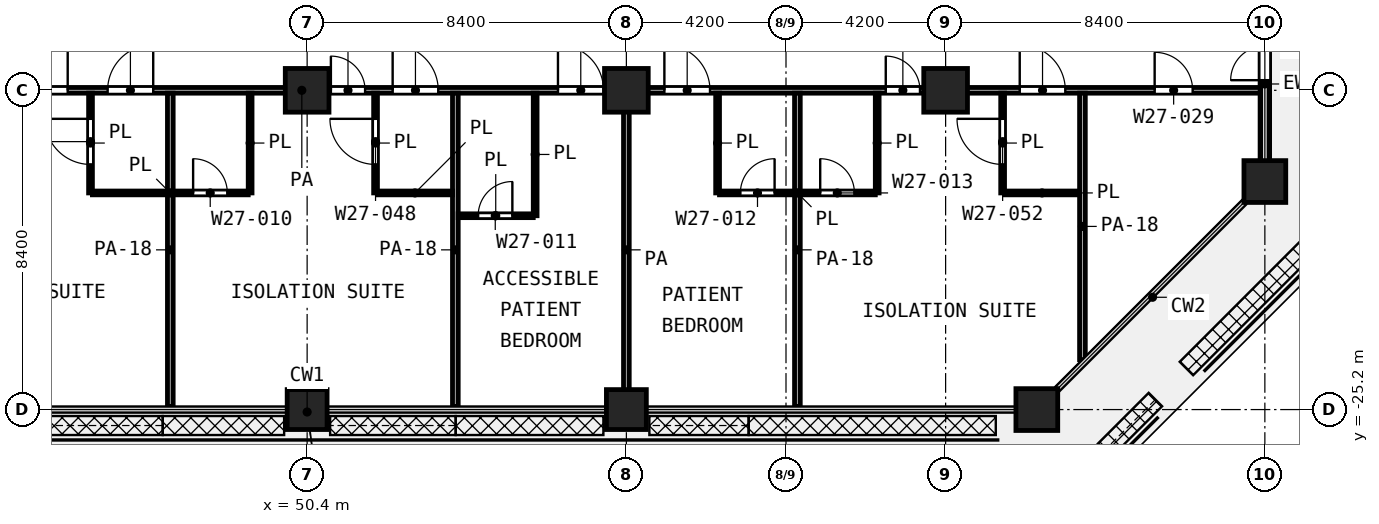
"""IFC4 building model, lengths in metres.
Left out: names, types, materials, properties, quantities, classifications, styles, units other than length and angle.
Written with IfcOpenShell. Run it as: python <this file> out.ifc"""

import sys

from ifc_helpers import new_model, si_unit, direction, frame, frame_2d, origin, origin_2d, place, context, subcontext, project, spatial, rectangle, extrude, element, fill, save


model = new_model("IFC4")
c1 = context("Model", 3, precision=1e-05, world=origin(), true_north=direction((0.0, 1.0)))
c2 = subcontext(c1, "Body", "Model", "MODEL_VIEW")
j1 = project(units=[si_unit("LENGTHUNIT", "METRE"), si_unit("PLANEANGLEUNIT", "RADIAN")], contexts=[c1])
p1 = place(None, origin())
s1 = spatial("IfcSite", under=j1, at=p1, CompositionType="ELEMENT")
p2 = place(p1, origin())
s2 = spatial("IfcBuilding", under=s1, at=p2, CompositionType="ELEMENT")
p3 = place(p2, frame((0.0, 0.0, 119.8)))
s3 = spatial("IfcBuildingStorey", under=s2, at=p3, CompositionType="ELEMENT", Elevation=119.8)
for number, where, z_axis, x_axis in (
    (1, (50.4, -16.8, 0.0), (0.0, 0.0, 1.0), (1.0, 0.0, 0.0)),
    (2, (58.8, -16.8, 0.0), (0.0, 0.0, 1.0), (1.0, 0.0, 0.0)),
    (3, (67.2, -16.8, 0.0), (0.0, 0.0, 1.0), (1.0, 0.0, 0.0)),
):
    element("IfcColumn", number, at=place(p3, frame(where, z_axis=z_axis, x_axis=x_axis)), inside=s3, PredefinedType="COLUMN", context=c2, shape_type="SweptSolid", body=[
        extrude(rectangle(XDim=1.15, YDim=1.15, at=origin_2d()), origin(), (0.0, 0.0, 1.0), 4.2),
    ])
p4 = place(p3, frame((75.6, -19.2, 0.0), z_axis=(0.0, 0.0, 1.0), x_axis=(1.0, 0.0, 0.0)))
e4 = element("IfcColumn", 4, at=p4, inside=s3, PredefinedType="COLUMN", context=c2, shape_type="SweptSolid", body=[
    extrude(rectangle(XDim=1.1, YDim=1.1, at=origin_2d()), origin(), (0.0, 0.0, 1.0), 4.2),
])
for number, where, z_axis, x_axis in (
    (5, (50.4, -25.2, 0.0), (0.0, 0.0, 1.0), (1.0, 0.0, 0.0)),
    (6, (58.8, -25.2, 0.0), (0.0, 0.0, 1.0), (1.0, 0.0, 0.0)),
):
    element("IfcColumn", number, at=place(p3, frame(where, z_axis=z_axis, x_axis=x_axis)), inside=s3, PredefinedType="COLUMN", context=c2, shape_type="SweptSolid", body=[
        extrude(rectangle(XDim=1.05, YDim=1.05, at=origin_2d()), origin(), (0.0, 0.0, 1.0), 4.2),
    ])
p5 = place(p3, frame((69.6, -25.2, 0.0), z_axis=(0.0, 0.0, 1.0), x_axis=(1.0, 0.0, 0.0)))
e7 = element("IfcColumn", 7, at=p5, inside=s3, PredefinedType="COLUMN", context=c2, shape_type="SweptSolid", body=[
    extrude(rectangle(XDim=1.1, YDim=1.1, at=origin_2d()), origin(), (0.0, 0.0, 1.0), 4.2),
])
p6 = place(p3, frame((75.6, -18.65, 0.0), z_axis=(0.0, 0.0, 1.0), x_axis=(0.0, 1.0, 0.0)))
e8 = element("IfcWall", 8, at=p6, inside=s3, PredefinedType="SOLIDWALL", context=c2, shape_type="SweptSolid", body=[
    extrude(rectangle(XDim=4.033, YDim=0.25, at=frame_2d((2.017, 0.0))), origin(), (0.0, 0.0, 1.0), 3.48),
])
p7 = place(p6, frame((2.117, 0.0, 0.0)))
e9 = element("IfcOpeningElement", 9, at=p7, cuts=e8, PredefinedType="OPENING", context=c2, shape_type="SweptSolid", body=[
    extrude(rectangle(XDim=1.8, YDim=2.1, at=frame_2d((0.9, 1.05))), frame((0.0, 0.135, 0.0), z_axis=(0.0, -1.0, 0.0), x_axis=(1.0, 0.0, 0.0)), (0.0, 0.0, 1.0), 0.27),
])
p8 = place(p3, frame((54.375, -20.1, 0.0), z_axis=(0.0, 0.0, 1.0), x_axis=(1.0, 0.0, 0.0)))
e10 = element("IfcWall", 10, at=p8, inside=s3, PredefinedType="PARTITIONING", context=c2, shape_type="SweptSolid", body=[
    extrude(rectangle(XDim=1.975, YDim=0.1, at=frame_2d((0.988, 0.0))), origin(), (0.0, 0.0, 1.0), 3.6),
])
p9 = place(p8, frame((0.525, 0.0, 0.0)))
e11 = element("IfcOpeningElement", 11, at=p9, cuts=e10, PredefinedType="OPENING", context=c2, shape_type="SweptSolid", body=[
    extrude(rectangle(XDim=0.9, YDim=2.1, at=frame_2d((0.45, 1.05))), frame((0.0, 0.06, 0.0), z_axis=(0.0, -1.0, 0.0), x_axis=(1.0, 0.0, 0.0)), (0.0, 0.0, 1.0), 0.12),
])
p10 = place(p3, frame((44.75, -19.5, 0.0), z_axis=(0.0, 0.0, 1.0), x_axis=(1.0, 0.0, 0.0)))
e12 = element("IfcWall", 12, at=p10, inside=s3, PredefinedType="PARTITIONING", context=c2, shape_type="SweptSolid", body=[
    extrude(rectangle(XDim=4.1, YDim=0.1, at=frame_2d((2.05, 0.0))), origin(), (0.0, 0.0, 1.0), 3.6),
])
p11 = place(p10, frame((2.65, 0.0, 0.0)))
e13 = element("IfcOpeningElement", 13, at=p11, cuts=e12, PredefinedType="OPENING", context=c2, shape_type="SweptSolid", body=[
    extrude(rectangle(XDim=0.9, YDim=2.1, at=frame_2d((0.45, 1.05))), frame((0.0, 0.06, 0.0), z_axis=(0.0, -1.0, 0.0), x_axis=(1.0, 0.0, 0.0)), (0.0, 0.0, 1.0), 0.12),
])
p12 = place(p3, frame((52.25, -19.5, 0.0), z_axis=(0.0, 0.0, 1.0), x_axis=(1.0, 0.0, 0.0)))
e14 = element("IfcWall", 14, at=p12, inside=s3, PredefinedType="PARTITIONING", context=c2, shape_type="SweptSolid", body=[
    extrude(rectangle(XDim=1.975, YDim=0.1, at=frame_2d((0.988, 0.0))), origin(), (0.0, 0.0, 1.0), 3.6),
])
p13 = place(p3, frame((61.25, -19.5, 0.0), z_axis=(0.0, 0.0, 1.0), x_axis=(1.0, 0.0, 0.0)))
e15 = element("IfcWall", 15, at=p13, inside=s3, PredefinedType="PARTITIONING", context=c2, shape_type="SweptSolid", body=[
    extrude(rectangle(XDim=4.1, YDim=0.1, at=frame_2d((2.05, 0.0))), origin(), (0.0, 0.0, 1.0), 3.6),
])
p14 = place(p13, frame((0.55, 0.0, 0.0)))
e16 = element("IfcOpeningElement", 16, at=p14, cuts=e15, PredefinedType="OPENING", context=c2, shape_type="SweptSolid", body=[
    extrude(rectangle(XDim=0.9, YDim=2.1, at=frame_2d((0.45, 1.05))), frame((0.0, 0.06, 0.0), z_axis=(0.0, -1.0, 0.0), x_axis=(1.0, 0.0, 0.0)), (0.0, 0.0, 1.0), 0.12),
])
p15 = place(p13, frame((2.65, 0.0, 0.0)))
e17 = element("IfcOpeningElement", 17, at=p15, cuts=e15, PredefinedType="OPENING", context=c2, shape_type="SweptSolid", body=[
    extrude(rectangle(XDim=0.9, YDim=2.1, at=frame_2d((0.45, 1.05))), frame((0.0, 0.06, 0.0), z_axis=(0.0, -1.0, 0.0), x_axis=(1.0, 0.0, 0.0)), (0.0, 0.0, 1.0), 0.12),
])
p16 = place(p3, frame((68.75, -19.5, 0.0), z_axis=(0.0, 0.0, 1.0), x_axis=(1.0, 0.0, 0.0)))
e18 = element("IfcWall", 18, at=p16, inside=s3, PredefinedType="PARTITIONING", context=c2, shape_type="SweptSolid", body=[
    extrude(rectangle(XDim=1.975, YDim=0.1, at=frame_2d((0.988, 0.0))), origin(), (0.0, 0.0, 1.0), 3.6),
])
p17 = place(p3, frame((44.7, -19.5, 0.0), z_axis=(0.0, 0.0, 1.0), x_axis=(0.0, 1.0, 0.0)))
e19 = element("IfcWall", 19, at=p17, inside=s3, PredefinedType="PARTITIONING", context=c2, shape_type="SweptSolid", body=[
    extrude(rectangle(XDim=2.625, YDim=0.1, at=frame_2d((1.312, 0.0))), origin(), (0.0, 0.0, 1.0), 3.6),
])
p18 = place(p17, frame((0.75, 0.0, 0.0)))
e20 = element("IfcOpeningElement", 20, at=p18, cuts=e19, PredefinedType="OPENING", context=c2, shape_type="SweptSolid", body=[
    extrude(rectangle(XDim=1.2, YDim=2.1, at=frame_2d((0.6, 1.05))), frame((0.0, 0.06, 0.0), z_axis=(0.0, -1.0, 0.0), x_axis=(1.0, 0.0, 0.0)), (0.0, 0.0, 1.0), 0.12),
])
p19 = place(p3, frame((48.9, -19.5, 0.0), z_axis=(0.0, 0.0, 1.0), x_axis=(0.0, 1.0, 0.0)))
e21 = element("IfcWall", 21, at=p19, inside=s3, PredefinedType="PARTITIONING", context=c2, shape_type="SweptSolid", body=[
    extrude(rectangle(XDim=2.625, YDim=0.1, at=frame_2d((1.312, 0.0))), origin(), (0.0, 0.0, 1.0), 3.6),
])
p20 = place(p3, frame((52.2, -19.5, 0.0), z_axis=(0.0, 0.0, 1.0), x_axis=(0.0, 1.0, 0.0)))
e22 = element("IfcWall", 22, at=p20, inside=s3, PredefinedType="PARTITIONING", context=c2, shape_type="SweptSolid", body=[
    extrude(rectangle(XDim=2.625, YDim=0.1, at=frame_2d((1.312, 0.0))), origin(), (0.0, 0.0, 1.0), 3.6),
])
p21 = place(p20, frame((0.75, 0.0, 0.0)))
e23 = element("IfcOpeningElement", 23, at=p21, cuts=e22, PredefinedType="OPENING", context=c2, shape_type="SweptSolid", body=[
    extrude(rectangle(XDim=1.2, YDim=2.1, at=frame_2d((0.6, 1.05))), frame((0.0, 0.06, 0.0), z_axis=(0.0, -1.0, 0.0), x_axis=(1.0, 0.0, 0.0)), (0.0, 0.0, 1.0), 0.12),
])
p22 = place(p3, frame((56.4, -20.1, 0.0), z_axis=(0.0, 0.0, 1.0), x_axis=(0.0, 1.0, 0.0)))
e24 = element("IfcWall", 24, at=p22, inside=s3, PredefinedType="PARTITIONING", context=c2, shape_type="SweptSolid", body=[
    extrude(rectangle(XDim=3.225, YDim=0.1, at=frame_2d((1.613, 0.0))), origin(), (0.0, 0.0, 1.0), 3.6),
])
for number, where, z_axis, x_axis in (
    (25, (61.2, -19.5, 0.0), (0.0, 0.0, 1.0), (0.0, 1.0, 0.0)),
    (26, (65.4, -19.5, 0.0), (0.0, 0.0, 1.0), (0.0, 1.0, 0.0)),
):
    element("IfcWall", number, at=place(p3, frame(where, z_axis=z_axis, x_axis=x_axis)), inside=s3, PredefinedType="PARTITIONING", context=c2, shape_type="SweptSolid", body=[
        extrude(rectangle(XDim=2.625, YDim=0.1, at=frame_2d((1.312, 0.0))), origin(), (0.0, 0.0, 1.0), 3.6),
    ])
p23 = place(p3, frame((68.7, -19.5, 0.0), z_axis=(0.0, 0.0, 1.0), x_axis=(0.0, 1.0, 0.0)))
e27 = element("IfcWall", 27, at=p23, inside=s3, PredefinedType="PARTITIONING", context=c2, shape_type="SweptSolid", body=[
    extrude(rectangle(XDim=2.625, YDim=0.1, at=frame_2d((1.312, 0.0))), origin(), (0.0, 0.0, 1.0), 3.6),
])
p24 = place(p23, frame((0.75, 0.0, 0.0)))
e28 = element("IfcOpeningElement", 28, at=p24, cuts=e27, PredefinedType="OPENING", context=c2, shape_type="SweptSolid", body=[
    extrude(rectangle(XDim=1.2, YDim=2.1, at=frame_2d((0.6, 1.05))), frame((0.0, 0.06, 0.0), z_axis=(0.0, -1.0, 0.0), x_axis=(1.0, 0.0, 0.0)), (0.0, 0.0, 1.0), 0.12),
])
p25 = place(p3, frame((25.0, -16.8, 0.0), z_axis=(0.0, 0.0, 1.0), x_axis=(1.0, 0.0, 0.0)))
e29 = element("IfcWall", 29, at=p25, inside=s3, PredefinedType="PARTITIONING", context=c2, shape_type="SweptSolid", body=[
    extrude(rectangle(XDim=50.52, YDim=0.15, at=frame_2d((25.26, 0.0))), origin(), (0.0, 0.0, 1.0), 3.6),
])
p26 = place(p25, frame((1.55, 0.0, 0.0)))
e30 = element("IfcOpeningElement", 30, at=p26, cuts=e29, PredefinedType="OPENING", context=c2, shape_type="SweptSolid", body=[
    extrude(rectangle(XDim=1.5, YDim=2.1, at=frame_2d((0.75, 1.05))), frame((0.0, 0.085, 0.0), z_axis=(0.0, -1.0, 0.0), x_axis=(1.0, 0.0, 0.0)), (0.0, 0.0, 1.0), 0.17),
])
p27 = place(p25, frame((6.0, 0.0, 0.0)))
e31 = element("IfcOpeningElement", 31, at=p27, cuts=e29, PredefinedType="OPENING", context=c2, shape_type="SweptSolid", body=[
    extrude(rectangle(XDim=1.0, YDim=2.1, at=frame_2d((0.5, 1.05))), frame((0.0, 0.085, 0.0), z_axis=(0.0, -1.0, 0.0), x_axis=(1.0, 0.0, 0.0)), (0.0, 0.0, 1.0), 0.17),
])
p28 = place(p25, frame((9.3, 0.0, 0.0)))
e32 = element("IfcOpeningElement", 32, at=p28, cuts=e29, PredefinedType="OPENING", context=c2, shape_type="SweptSolid", body=[
    extrude(rectangle(XDim=1.2, YDim=2.1, at=frame_2d((0.6, 1.05))), frame((0.0, 0.085, 0.0), z_axis=(0.0, -1.0, 0.0), x_axis=(1.0, 0.0, 0.0)), (0.0, 0.0, 1.0), 0.17),
])
p29 = place(p25, frame((17.9, 0.0, 0.0)))
e33 = element("IfcOpeningElement", 33, at=p29, cuts=e29, PredefinedType="OPENING", context=c2, shape_type="SweptSolid", body=[
    extrude(rectangle(XDim=1.2, YDim=2.1, at=frame_2d((0.6, 1.05))), frame((0.0, 0.085, 0.0), z_axis=(0.0, -1.0, 0.0), x_axis=(1.0, 0.0, 0.0)), (0.0, 0.0, 1.0), 0.17),
])
p30 = place(p25, frame((15.2, 0.0, 0.0)))
e34 = element("IfcOpeningElement", 34, at=p30, cuts=e29, PredefinedType="OPENING", context=c2, shape_type="SweptSolid", body=[
    extrude(rectangle(XDim=1.2, YDim=2.1, at=frame_2d((0.6, 1.05))), frame((0.0, 0.085, 0.0), z_axis=(0.0, -1.0, 0.0), x_axis=(1.0, 0.0, 0.0)), (0.0, 0.0, 1.0), 0.17),
])
p31 = place(p25, frame((20.15, 0.0, 0.0)))
e35 = element("IfcOpeningElement", 35, at=p31, cuts=e29, PredefinedType="OPENING", context=c2, shape_type="SweptSolid", body=[
    extrude(rectangle(XDim=1.2, YDim=2.1, at=frame_2d((0.6, 1.05))), frame((0.0, 0.085, 0.0), z_axis=(0.0, -1.0, 0.0), x_axis=(1.0, 0.0, 0.0)), (0.0, 0.0, 1.0), 0.17),
])
p32 = place(p25, frame((26.025, 0.0, 0.0)))
e36 = element("IfcOpeningElement", 36, at=p32, cuts=e29, PredefinedType="OPENING", context=c2, shape_type="SweptSolid", body=[
    extrude(rectangle(XDim=0.9, YDim=2.1, at=frame_2d((0.45, 1.05))), frame((0.0, 0.085, 0.0), z_axis=(0.0, -1.0, 0.0), x_axis=(1.0, 0.0, 0.0)), (0.0, 0.0, 1.0), 0.17),
])
p33 = place(p25, frame((27.65, 0.0, 0.0)))
e37 = element("IfcOpeningElement", 37, at=p33, cuts=e29, PredefinedType="OPENING", context=c2, shape_type="SweptSolid", body=[
    extrude(rectangle(XDim=1.2, YDim=2.1, at=frame_2d((0.6, 1.05))), frame((0.0, 0.085, 0.0), z_axis=(0.0, -1.0, 0.0), x_axis=(1.0, 0.0, 0.0)), (0.0, 0.0, 1.0), 0.17),
])
p34 = place(p25, frame((32.0, 0.0, 0.0)))
e38 = element("IfcOpeningElement", 38, at=p34, cuts=e29, PredefinedType="OPENING", context=c2, shape_type="SweptSolid", body=[
    extrude(rectangle(XDim=1.2, YDim=2.1, at=frame_2d((0.6, 1.05))), frame((0.0, 0.085, 0.0), z_axis=(0.0, -1.0, 0.0), x_axis=(1.0, 0.0, 0.0)), (0.0, 0.0, 1.0), 0.17),
])
p35 = place(p25, frame((34.8, 0.0, 0.0)))
e39 = element("IfcOpeningElement", 39, at=p35, cuts=e29, PredefinedType="OPENING", context=c2, shape_type="SweptSolid", body=[
    extrude(rectangle(XDim=1.2, YDim=2.1, at=frame_2d((0.6, 1.05))), frame((0.0, 0.085, 0.0), z_axis=(0.0, -1.0, 0.0), x_axis=(1.0, 0.0, 0.0)), (0.0, 0.0, 1.0), 0.17),
])
p36 = place(p25, frame((40.625, 0.0, 0.0)))
e40 = element("IfcOpeningElement", 40, at=p36, cuts=e29, PredefinedType="OPENING", context=c2, shape_type="SweptSolid", body=[
    extrude(rectangle(XDim=0.9, YDim=2.1, at=frame_2d((0.45, 1.05))), frame((0.0, 0.085, 0.0), z_axis=(0.0, -1.0, 0.0), x_axis=(1.0, 0.0, 0.0)), (0.0, 0.0, 1.0), 0.17),
])
p37 = place(p25, frame((44.15, 0.0, 0.0)))
e41 = element("IfcOpeningElement", 41, at=p37, cuts=e29, PredefinedType="OPENING", context=c2, shape_type="SweptSolid", body=[
    extrude(rectangle(XDim=1.2, YDim=2.1, at=frame_2d((0.6, 1.05))), frame((0.0, 0.085, 0.0), z_axis=(0.0, -1.0, 0.0), x_axis=(1.0, 0.0, 0.0)), (0.0, 0.0, 1.0), 0.17),
])
p38 = place(p25, frame((47.7, 0.0, 0.0)))
e42 = element("IfcOpeningElement", 42, at=p38, cuts=e29, PredefinedType="OPENING", context=c2, shape_type="SweptSolid", body=[
    extrude(rectangle(XDim=1.0, YDim=2.1, at=frame_2d((0.5, 1.05))), frame((0.0, 0.085, 0.0), z_axis=(0.0, -1.0, 0.0), x_axis=(1.0, 0.0, 0.0)), (0.0, 0.0, 1.0), 0.17),
])
for number, where, z_axis, x_axis in (
    (43, (46.8, -25.12, 0.0), (0.0, 0.0, 1.0), (0.0, 1.0, 0.0)),
    (44, (54.3, -25.12, 0.0), (0.0, 0.0, 1.0), (0.0, 1.0, 0.0)),
):
    element("IfcWall", number, at=place(p3, frame(where, z_axis=z_axis, x_axis=x_axis)), inside=s3, PredefinedType="PARTITIONING", context=c2, shape_type="SweptSolid", body=[
        extrude(rectangle(XDim=8.245, YDim=0.15, at=frame_2d((4.123, 0.0))), origin(), (0.0, 0.0, 1.0), 2.7),
    ])
p39 = place(p3, frame((58.8, -25.12, 0.0), z_axis=(0.0, 0.0, 1.0), x_axis=(0.0, 1.0, 0.0)))
e45 = element("IfcWall", 45, at=p39, inside=s3, PredefinedType="PARTITIONING", context=c2, shape_type="SweptSolid", body=[
    extrude(rectangle(XDim=8.245, YDim=0.15, at=frame_2d((4.123, 0.0))), origin(), (0.0, 0.0, 1.0), 3.6),
])
p40 = place(p3, frame((63.3, -25.12, 0.0), z_axis=(0.0, 0.0, 1.0), x_axis=(0.0, 1.0, 0.0)))
e46 = element("IfcWall", 46, at=p40, inside=s3, PredefinedType="PARTITIONING", context=c2, shape_type="SweptSolid", body=[
    extrude(rectangle(XDim=8.245, YDim=0.15, at=frame_2d((4.123, 0.0))), origin(), (0.0, 0.0, 1.0), 2.7),
])
p41 = place(p3, frame((70.8, -23.887, 0.0), z_axis=(0.0, 0.0, 1.0), x_axis=(0.0, 1.0, 0.0)))
e47 = element("IfcWall", 47, at=p41, inside=s3, PredefinedType="PARTITIONING", context=c2, shape_type="SweptSolid", body=[
    extrude(rectangle(XDim=7.012, YDim=0.15, at=frame_2d((3.506, 0.0))), origin(), (0.0, 0.0, 1.0), 2.7),
])
p42 = place(p7, origin())
e48 = element("IfcDoor", 48, at=p42, inside=s3, OperationType="DOUBLE_DOOR_SINGLE_SWING", PredefinedType="DOOR", context=c2, shape_type="SweptSolid", body=[
    extrude(rectangle(XDim=1.8, YDim=2.1, at=frame_2d((0.9, 1.05))), frame((0.0, 0.025, 0.0), z_axis=(0.0, -1.0, 0.0), x_axis=(1.0, 0.0, 0.0)), (0.0, 0.0, 1.0), 0.05),
])
fill(e9, e48)
p43 = place(p29, origin())
e49 = element("IfcDoor", 49, at=p43, inside=s3, OperationType="SINGLE_SWING_RIGHT", PredefinedType="DOOR", context=c2, shape_type="SweptSolid", body=[
    extrude(rectangle(XDim=1.2, YDim=2.1, at=frame_2d((0.6, 1.05))), frame((0.0, 0.025, 0.0), z_axis=(0.0, -1.0, 0.0), x_axis=(1.0, 0.0, 0.0)), (0.0, 0.0, 1.0), 0.05),
])
fill(e33, e49)
p44 = place(p31, origin())
e50 = element("IfcDoor", 50, at=p44, inside=s3, OperationType="SINGLE_SWING_RIGHT", PredefinedType="DOOR", context=c2, shape_type="SweptSolid", body=[
    extrude(rectangle(XDim=1.2, YDim=2.1, at=frame_2d((0.6, 1.05))), frame((0.0, 0.025, 0.0), z_axis=(0.0, -1.0, 0.0), x_axis=(1.0, 0.0, 0.0)), (0.0, 0.0, 1.0), 0.05),
])
fill(e35, e50)
p45 = place(p18, origin())
e51 = element("IfcDoor", 51, at=p45, inside=s3, OperationType="SINGLE_SWING_RIGHT", PredefinedType="DOOR", context=c2, shape_type="SweptSolid", body=[
    extrude(rectangle(XDim=1.2, YDim=2.1, at=frame_2d((0.6, 1.05))), frame((0.0, 0.025, 0.0), z_axis=(0.0, -1.0, 0.0), x_axis=(1.0, 0.0, 0.0)), (0.0, 0.0, 1.0), 0.05),
])
fill(e20, e51)
p46 = place(p32, origin())
e52 = element("IfcDoor", 52, at=p46, inside=s3, OperationType="SINGLE_SWING_LEFT", PredefinedType="DOOR", context=c2, shape_type="SweptSolid", body=[
    extrude(rectangle(XDim=0.9, YDim=2.1, at=frame_2d((0.45, 1.05))), frame((0.0, 0.025, 0.0), z_axis=(0.0, -1.0, 0.0), x_axis=(1.0, 0.0, 0.0)), (0.0, 0.0, 1.0), 0.05),
])
fill(e36, e52)
p47 = place(p33, origin())
e53 = element("IfcDoor", 53, at=p47, inside=s3, OperationType="SINGLE_SWING_LEFT", PredefinedType="DOOR", context=c2, shape_type="SweptSolid", body=[
    extrude(rectangle(XDim=1.2, YDim=2.1, at=frame_2d((0.6, 1.05))), frame((0.0, 0.025, 0.0), z_axis=(0.0, -1.0, 0.0), x_axis=(1.0, 0.0, 0.0)), (0.0, 0.0, 1.0), 0.05),
])
fill(e37, e53)
p48 = place(p21, origin())
e54 = element("IfcDoor", 54, at=p48, inside=s3, OperationType="SINGLE_SWING_RIGHT", PredefinedType="DOOR", context=c2, shape_type="SweptSolid", body=[
    extrude(rectangle(XDim=1.2, YDim=2.1, at=frame_2d((0.6, 1.05))), frame((0.0, 0.025, 0.0), z_axis=(0.0, -1.0, 0.0), x_axis=(1.0, 0.0, 0.0)), (0.0, 0.0, 1.0), 0.05),
])
fill(e23, e54)
p49 = place(p11, origin())
e55 = element("IfcDoor", 55, at=p49, inside=s3, OperationType="SINGLE_SWING_LEFT", PredefinedType="DOOR", context=c2, shape_type="SweptSolid", body=[
    extrude(rectangle(XDim=0.9, YDim=2.1, at=frame_2d((0.45, 1.05))), frame((0.0, 0.025, 0.0), z_axis=(0.0, -1.0, 0.0), x_axis=(1.0, 0.0, 0.0)), (0.0, 0.0, 1.0), 0.05),
])
fill(e13, e55)
p50 = place(p34, origin())
e56 = element("IfcDoor", 56, at=p50, inside=s3, OperationType="SINGLE_SWING_LEFT", PredefinedType="DOOR", context=c2, shape_type="SweptSolid", body=[
    extrude(rectangle(XDim=1.2, YDim=2.1, at=frame_2d((0.6, 1.05))), frame((0.0, 0.025, 0.0), z_axis=(0.0, -1.0, 0.0), x_axis=(1.0, 0.0, 0.0)), (0.0, 0.0, 1.0), 0.05),
])
fill(e38, e56)
p51 = place(p9, origin())
e57 = element("IfcDoor", 57, at=p51, inside=s3, OperationType="SINGLE_SWING_RIGHT", PredefinedType="DOOR", context=c2, shape_type="SweptSolid", body=[
    extrude(rectangle(XDim=0.9, YDim=2.1, at=frame_2d((0.45, 1.05))), frame((0.0, 0.025, 0.0), z_axis=(0.0, -1.0, 0.0), x_axis=(1.0, 0.0, 0.0)), (0.0, 0.0, 1.0), 0.05),
])
fill(e11, e57)
p52 = place(p35, origin())
e58 = element("IfcDoor", 58, at=p52, inside=s3, OperationType="SINGLE_SWING_LEFT", PredefinedType="DOOR", context=c2, shape_type="SweptSolid", body=[
    extrude(rectangle(XDim=1.2, YDim=2.1, at=frame_2d((0.6, 1.05))), frame((0.0, 0.025, 0.0), z_axis=(0.0, -1.0, 0.0), x_axis=(1.0, 0.0, 0.0)), (0.0, 0.0, 1.0), 0.05),
])
fill(e39, e58)
p53 = place(p14, origin())
e59 = element("IfcDoor", 59, at=p53, inside=s3, OperationType="SINGLE_SWING_RIGHT", PredefinedType="DOOR", context=c2, shape_type="SweptSolid", body=[
    extrude(rectangle(XDim=0.9, YDim=2.1, at=frame_2d((0.45, 1.05))), frame((0.0, 0.025, 0.0), z_axis=(0.0, -1.0, 0.0), x_axis=(1.0, 0.0, 0.0)), (0.0, 0.0, 1.0), 0.05),
])
fill(e16, e59)
p54 = place(p36, origin())
e60 = element("IfcDoor", 60, at=p54, inside=s3, OperationType="SINGLE_SWING_LEFT", PredefinedType="DOOR", context=c2, shape_type="SweptSolid", body=[
    extrude(rectangle(XDim=0.9, YDim=2.1, at=frame_2d((0.45, 1.05))), frame((0.0, 0.025, 0.0), z_axis=(0.0, -1.0, 0.0), x_axis=(1.0, 0.0, 0.0)), (0.0, 0.0, 1.0), 0.05),
])
fill(e40, e60)
p55 = place(p37, origin())
e61 = element("IfcDoor", 61, at=p55, inside=s3, OperationType="SINGLE_SWING_LEFT", PredefinedType="DOOR", context=c2, shape_type="SweptSolid", body=[
    extrude(rectangle(XDim=1.2, YDim=2.1, at=frame_2d((0.6, 1.05))), frame((0.0, 0.025, 0.0), z_axis=(0.0, -1.0, 0.0), x_axis=(1.0, 0.0, 0.0)), (0.0, 0.0, 1.0), 0.05),
])
fill(e41, e61)
p56 = place(p24, origin())
e62 = element("IfcDoor", 62, at=p56, inside=s3, OperationType="SINGLE_SWING_RIGHT", PredefinedType="DOOR", context=c2, shape_type="SweptSolid", body=[
    extrude(rectangle(XDim=1.2, YDim=2.1, at=frame_2d((0.6, 1.05))), frame((0.0, 0.025, 0.0), z_axis=(0.0, -1.0, 0.0), x_axis=(1.0, 0.0, 0.0)), (0.0, 0.0, 1.0), 0.05),
])
fill(e28, e62)
p57 = place(p15, origin())
e63 = element("IfcDoor", 63, at=p57, inside=s3, OperationType="SINGLE_SWING_LEFT", PredefinedType="DOOR", context=c2, shape_type="SweptSolid", body=[
    extrude(rectangle(XDim=0.9, YDim=2.1, at=frame_2d((0.45, 1.05))), frame((0.0, 0.025, 0.0), z_axis=(0.0, -1.0, 0.0), x_axis=(1.0, 0.0, 0.0)), (0.0, 0.0, 1.0), 0.05),
])
fill(e17, e63)
p58 = place(p38, origin())
e64 = element("IfcDoor", 64, at=p58, inside=s3, OperationType="SINGLE_SWING_LEFT", PredefinedType="DOOR", context=c2, shape_type="SweptSolid", body=[
    extrude(rectangle(XDim=1.0, YDim=2.1, at=frame_2d((0.5, 1.05))), frame((0.0, 0.025, 0.0), z_axis=(0.0, -1.0, 0.0), x_axis=(1.0, 0.0, 0.0)), (0.0, 0.0, 1.0), 0.05),
])
fill(e42, e64)
save(model, sys.argv[1])
